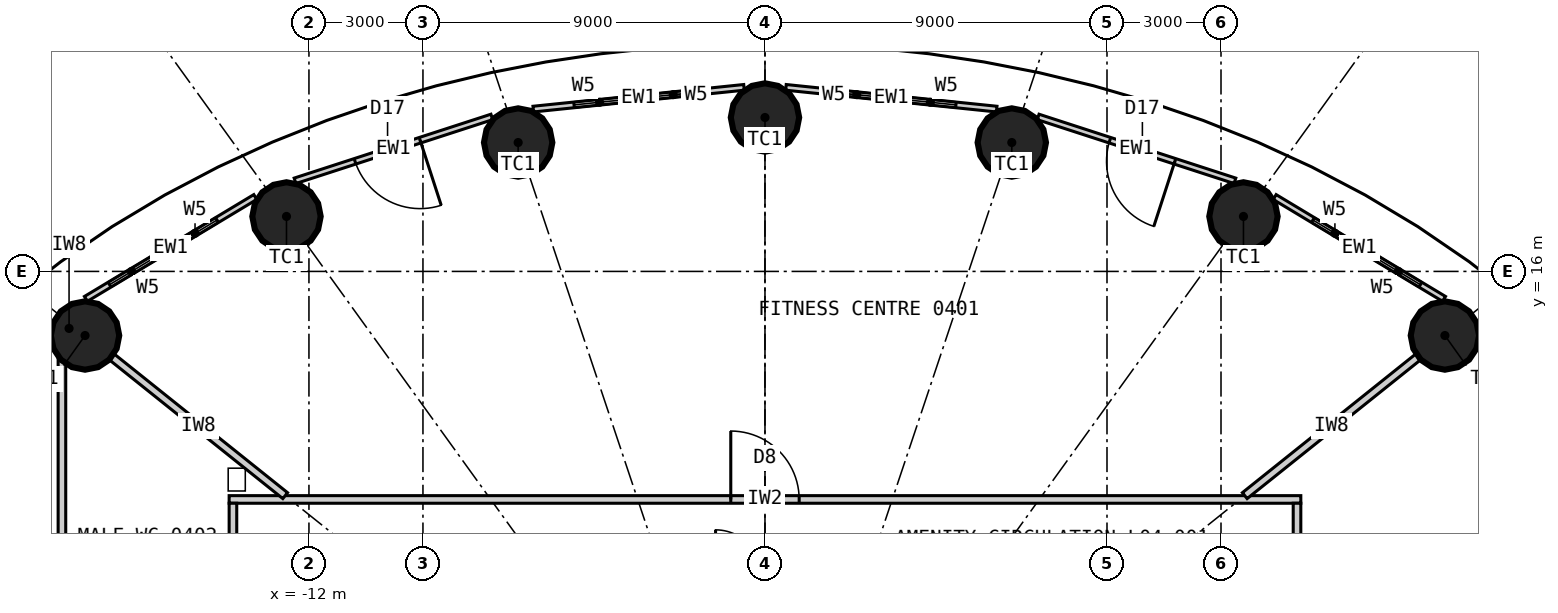
"""IFC4 building model, lengths in metres.
Left out: names, types, materials, properties, quantities, classifications, styles, units other than length and angle.
Written with IfcOpenShell. Run it as: python <this file> out.ifc"""

import sys

from ifc_helpers import new_model, si_unit, direction, frame, frame_2d, origin, origin_2d, place, context, subcontext, project, spatial, rectangle, circle, extrude, element, fill, save


model = new_model("IFC4")
c1 = context("Model", 3, precision=1e-05, world=origin(), true_north=direction((0.0, 1.0)))
c2 = subcontext(c1, "Body", "Model", "MODEL_VIEW")
j1 = project(units=[si_unit("LENGTHUNIT", "METRE"), si_unit("PLANEANGLEUNIT", "RADIAN")], contexts=[c1])
p1 = place(None, origin())
s1 = spatial("IfcSite", under=j1, at=p1, CompositionType="ELEMENT")
p2 = place(p1, origin())
s2 = spatial("IfcBuilding", under=s1, at=p2, CompositionType="ELEMENT")
p3 = place(p2, frame((0.0, 0.0, 24.6)))
s3 = spatial("IfcBuildingStorey", under=s2, at=p3, CompositionType="ELEMENT", Elevation=24.6)
for number, where, z_axis, x_axis in (
    (1, (17.892, 14.313, 0.0), (0.0, 0.0, 1.0), (1.0, 0.0, 0.0)),
    (2, (12.591, 17.447, 0.0), (0.0, 0.0, 1.0), (1.0, 0.0, 0.0)),
    (3, (6.495, 19.391, 0.0), (0.0, 0.0, 1.0), (1.0, 0.0, 0.0)),
    (4, (0.0, 20.05, 0.0), (0.0, 0.0, 1.0), (1.0, 0.0, 0.0)),
    (5, (-6.495, 19.391, 0.0), (0.0, 0.0, 1.0), (1.0, 0.0, 0.0)),
    (6, (-12.591, 17.447, 0.0), (0.0, 0.0, 1.0), (1.0, 0.0, 0.0)),
    (7, (-17.892, 14.313, 0.0), (0.0, 0.0, 1.0), (1.0, 0.0, 0.0)),
):
    element("IfcColumn", number, at=place(p3, frame(where, z_axis=z_axis, x_axis=x_axis)), inside=s3, PredefinedType="COLUMN", context=c2, shape_type="SweptSolid", body=[
        extrude(circle(Radius=0.9, at=origin_2d()), origin(), (0.0, 0.0, 1.0), 4.8),
    ])
p4 = place(p3, frame((22.239, 11.108, 0.0), z_axis=(0.0, 0.0, 1.0), x_axis=(-0.699612594083, 0.714522370679, 0.0)))
e8 = element("IfcWall", 8, at=p4, inside=s3, PredefinedType="ELEMENTEDWALL", context=c2, shape_type="SweptSolid", body=[
    extrude(rectangle(XDim=4.896, YDim=0.15, at=frame_2d((2.448, 0.0))), origin(), (0.0, 0.0, 1.0), 4.62),
])
p5 = place(p4, frame((0.569, 0.0, 0.6)))
e9 = element("IfcOpeningElement", 9, at=p5, cuts=e8, PredefinedType="OPENING", context=c2, shape_type="SweptSolid", body=[
    extrude(rectangle(XDim=1.35, YDim=3.0, at=frame_2d((0.675, 1.5))), frame((0.0, 0.085, 0.0), z_axis=(0.0, -1.0, 0.0), x_axis=(1.0, 0.0, 0.0)), (0.0, 0.0, 1.0), 0.17),
])
p6 = place(p4, frame((2.519, 0.0, 0.6)))
e10 = element("IfcOpeningElement", 10, at=p6, cuts=e8, PredefinedType="OPENING", context=c2, shape_type="SweptSolid", body=[
    extrude(rectangle(XDim=1.35, YDim=3.0, at=frame_2d((0.675, 1.5))), frame((0.0, 0.085, 0.0), z_axis=(0.0, -1.0, 0.0), x_axis=(1.0, 0.0, 0.0)), (0.0, 0.0, 1.0), 0.17),
])
p7 = place(p3, frame((17.869, 15.277, 0.0), z_axis=(0.0, 0.0, 1.0), x_axis=(-0.856958191554, 0.515385931054, 0.0)))
e11 = element("IfcWall", 11, at=p7, inside=s3, PredefinedType="ELEMENTEDWALL", context=c2, shape_type="SweptSolid", body=[
    extrude(rectangle(XDim=5.201, YDim=0.15, at=frame_2d((2.601, 0.0))), origin(), (0.0, 0.0, 1.0), 4.62),
])
p8 = place(p7, frame((0.726, 0.0, 0.6)))
e12 = element("IfcOpeningElement", 12, at=p8, cuts=e11, PredefinedType="OPENING", context=c2, shape_type="SweptSolid", body=[
    extrude(rectangle(XDim=1.35, YDim=3.0, at=frame_2d((0.675, 1.5))), frame((0.0, 0.085, 0.0), z_axis=(0.0, -1.0, 0.0), x_axis=(1.0, 0.0, 0.0)), (0.0, 0.0, 1.0), 0.17),
])
p9 = place(p7, frame((2.676, 0.0, 0.6)))
e13 = element("IfcOpeningElement", 13, at=p9, cuts=e11, PredefinedType="OPENING", context=c2, shape_type="SweptSolid", body=[
    extrude(rectangle(XDim=1.35, YDim=3.0, at=frame_2d((0.675, 1.5))), frame((0.0, 0.085, 0.0), z_axis=(0.0, -1.0, 0.0), x_axis=(1.0, 0.0, 0.0)), (0.0, 0.0, 1.0), 0.17),
])
p10 = place(p3, frame((12.366, 18.384, 0.0), z_axis=(0.0, 0.0, 1.0), x_axis=(-0.951138486029, 0.308764603532, 0.0)))
e14 = element("IfcWall", 14, at=p10, inside=s3, PredefinedType="ELEMENTEDWALL", context=c2, shape_type="SweptSolid", body=[
    extrude(rectangle(XDim=5.444, YDim=0.15, at=frame_2d((2.722, 0.0))), origin(), (0.0, 0.0, 1.0), 4.62),
])
p11 = place(p10, frame((1.66, 0.0, 0.0)))
e15 = element("IfcOpeningElement", 15, at=p11, cuts=e14, PredefinedType="OPENING", context=c2, shape_type="SweptSolid", body=[
    extrude(rectangle(XDim=1.8, YDim=2.7, at=frame_2d((0.9, 1.35))), frame((0.0, 0.085, 0.0), z_axis=(0.0, -1.0, 0.0), x_axis=(1.0, 0.0, 0.0)), (0.0, 0.0, 1.0), 0.17),
])
p12 = place(p3, frame((6.098, 20.271, 0.0), z_axis=(0.0, 0.0, 1.0), x_axis=(-0.994723735084, 0.102589915983, 0.0)))
e16 = element("IfcWall", 16, at=p12, inside=s3, PredefinedType="ELEMENTEDWALL", context=c2, shape_type="SweptSolid", body=[
    extrude(rectangle(XDim=5.576, YDim=0.15, at=frame_2d((2.788, 0.0))), origin(), (0.0, 0.0, 1.0), 4.62),
])
p13 = place(p12, frame((1.079, 0.0, 0.6)))
e17 = element("IfcOpeningElement", 17, at=p13, cuts=e16, PredefinedType="OPENING", context=c2, shape_type="SweptSolid", body=[
    extrude(rectangle(XDim=1.35, YDim=3.0, at=frame_2d((0.675, 1.5))), frame((0.0, 0.085, 0.0), z_axis=(0.0, -1.0, 0.0), x_axis=(1.0, 0.0, 0.0)), (0.0, 0.0, 1.0), 0.17),
])
p14 = place(p12, frame((3.029, 0.0, 0.6)))
e18 = element("IfcOpeningElement", 18, at=p14, cuts=e16, PredefinedType="OPENING", context=c2, shape_type="SweptSolid", body=[
    extrude(rectangle(XDim=1.35, YDim=3.0, at=frame_2d((0.675, 1.5))), frame((0.0, 0.085, 0.0), z_axis=(0.0, -1.0, 0.0), x_axis=(1.0, 0.0, 0.0)), (0.0, 0.0, 1.0), 0.17),
])
p15 = place(p3, frame((-0.551, 20.843, 0.0), z_axis=(0.0, 0.0, 1.0), x_axis=(-0.994723735084, -0.102589915983, 0.0)))
e19 = element("IfcWall", 19, at=p15, inside=s3, PredefinedType="ELEMENTEDWALL", context=c2, shape_type="SweptSolid", body=[
    extrude(rectangle(XDim=5.576, YDim=0.15, at=frame_2d((2.788, 0.0))), origin(), (0.0, 0.0, 1.0), 4.62),
])
p16 = place(p15, frame((1.197, 0.0, 0.6)))
e20 = element("IfcOpeningElement", 20, at=p16, cuts=e19, PredefinedType="OPENING", context=c2, shape_type="SweptSolid", body=[
    extrude(rectangle(XDim=1.35, YDim=3.0, at=frame_2d((0.675, 1.5))), frame((0.0, 0.085, 0.0), z_axis=(0.0, -1.0, 0.0), x_axis=(1.0, 0.0, 0.0)), (0.0, 0.0, 1.0), 0.17),
])
p17 = place(p15, frame((3.147, 0.0, 0.6)))
e21 = element("IfcOpeningElement", 21, at=p17, cuts=e19, PredefinedType="OPENING", context=c2, shape_type="SweptSolid", body=[
    extrude(rectangle(XDim=1.35, YDim=3.0, at=frame_2d((0.675, 1.5))), frame((0.0, 0.085, 0.0), z_axis=(0.0, -1.0, 0.0), x_axis=(1.0, 0.0, 0.0)), (0.0, 0.0, 1.0), 0.17),
])
p18 = place(p3, frame((-7.188, 20.065, 0.0), z_axis=(0.0, 0.0, 1.0), x_axis=(-0.951138486029, -0.308764603532, 0.0)))
e22 = element("IfcWall", 22, at=p18, inside=s3, PredefinedType="ELEMENTEDWALL", context=c2, shape_type="SweptSolid", body=[
    extrude(rectangle(XDim=5.444, YDim=0.15, at=frame_2d((2.722, 0.0))), origin(), (0.0, 0.0, 1.0), 4.62),
])
p19 = place(p18, frame((1.984, 0.0, 0.0)))
e23 = element("IfcOpeningElement", 23, at=p19, cuts=e22, PredefinedType="OPENING", context=c2, shape_type="SweptSolid", body=[
    extrude(rectangle(XDim=1.8, YDim=2.7, at=frame_2d((0.9, 1.35))), frame((0.0, 0.085, 0.0), z_axis=(0.0, -1.0, 0.0), x_axis=(1.0, 0.0, 0.0)), (0.0, 0.0, 1.0), 0.17),
])
p20 = place(p3, frame((-13.412, 17.957, 0.0), z_axis=(0.0, 0.0, 1.0), x_axis=(-0.856958191554, -0.515385931054, 0.0)))
e24 = element("IfcWall", 24, at=p20, inside=s3, PredefinedType="ELEMENTEDWALL", context=c2, shape_type="SweptSolid", body=[
    extrude(rectangle(XDim=5.201, YDim=0.15, at=frame_2d((2.601, 0.0))), origin(), (0.0, 0.0, 1.0), 4.62),
])
p21 = place(p20, frame((1.175, 0.0, 0.6)))
e25 = element("IfcOpeningElement", 25, at=p21, cuts=e24, PredefinedType="OPENING", context=c2, shape_type="SweptSolid", body=[
    extrude(rectangle(XDim=1.35, YDim=3.0, at=frame_2d((0.675, 1.5))), frame((0.0, 0.085, 0.0), z_axis=(0.0, -1.0, 0.0), x_axis=(1.0, 0.0, 0.0)), (0.0, 0.0, 1.0), 0.17),
])
p22 = place(p20, frame((3.125, 0.0, 0.6)))
e26 = element("IfcOpeningElement", 26, at=p22, cuts=e24, PredefinedType="OPENING", context=c2, shape_type="SweptSolid", body=[
    extrude(rectangle(XDim=1.35, YDim=3.0, at=frame_2d((0.675, 1.5))), frame((0.0, 0.085, 0.0), z_axis=(0.0, -1.0, 0.0), x_axis=(1.0, 0.0, 0.0)), (0.0, 0.0, 1.0), 0.17),
])
p23 = place(p3, frame((-18.813, 14.607, 0.0), z_axis=(0.0, 0.0, 1.0), x_axis=(-0.699612594083, -0.714522370679, 0.0)))
e27 = element("IfcWall", 27, at=p23, inside=s3, PredefinedType="ELEMENTEDWALL", context=c2, shape_type="SweptSolid", body=[
    extrude(rectangle(XDim=4.896, YDim=0.15, at=frame_2d((2.448, 0.0))), origin(), (0.0, 0.0, 1.0), 4.62),
])
p24 = place(p23, frame((1.027, 0.0, 0.6)))
e28 = element("IfcOpeningElement", 28, at=p24, cuts=e27, PredefinedType="OPENING", context=c2, shape_type="SweptSolid", body=[
    extrude(rectangle(XDim=1.35, YDim=3.0, at=frame_2d((0.675, 1.5))), frame((0.0, 0.085, 0.0), z_axis=(0.0, -1.0, 0.0), x_axis=(1.0, 0.0, 0.0)), (0.0, 0.0, 1.0), 0.17),
])
p25 = place(p23, frame((2.977, 0.0, 0.6)))
e29 = element("IfcOpeningElement", 29, at=p25, cuts=e27, PredefinedType="OPENING", context=c2, shape_type="SweptSolid", body=[
    extrude(rectangle(XDim=1.35, YDim=3.0, at=frame_2d((0.675, 1.5))), frame((0.0, 0.085, 0.0), z_axis=(0.0, -1.0, 0.0), x_axis=(1.0, 0.0, 0.0)), (0.0, 0.0, 1.0), 0.17),
])
p26 = place(p3, frame((-14.1, 10.0, 0.0), z_axis=(0.0, 0.0, 1.0), x_axis=(1.0, 0.0, 0.0)))
e30 = element("IfcWall", 30, at=p26, inside=s3, PredefinedType="PARTITIONING", context=c2, shape_type="SweptSolid", body=[
    extrude(rectangle(XDim=28.2, YDim=0.2, at=frame_2d((14.1, 0.0))), origin(), (0.0, 0.0, 1.0), 4.62),
])
p27 = place(p26, frame((13.2, 0.0, 0.0)))
e31 = element("IfcOpeningElement", 31, at=p27, cuts=e30, PredefinedType="OPENING", context=c2, shape_type="SweptSolid", body=[
    extrude(rectangle(XDim=1.8, YDim=2.4, at=frame_2d((0.9, 1.2))), frame((0.0, 0.11, 0.0), z_axis=(0.0, -1.0, 0.0), x_axis=(1.0, 0.0, 0.0)), (0.0, 0.0, 1.0), 0.22),
])
p28 = place(p3, frame((14.0, -9.9, 0.0), z_axis=(0.0, 0.0, 1.0), x_axis=(0.0, 1.0, 0.0)))
e32 = element("IfcWall", 32, at=p28, inside=s3, PredefinedType="PARTITIONING", context=c2, shape_type="SweptSolid", body=[
    extrude(rectangle(XDim=19.8, YDim=0.2, at=frame_2d((9.9, 0.0))), origin(), (0.0, 0.0, 1.0), 4.62),
])
p29 = place(p28, frame((9.0, 0.0, 0.0)))
e33 = element("IfcOpeningElement", 33, at=p29, cuts=e32, PredefinedType="OPENING", context=c2, shape_type="SweptSolid", body=[
    extrude(rectangle(XDim=1.8, YDim=2.4, at=frame_2d((0.9, 1.2))), frame((0.0, 0.11, 0.0), z_axis=(0.0, -1.0, 0.0), x_axis=(1.0, 0.0, 0.0)), (0.0, 0.0, 1.0), 0.22),
])
p30 = place(p3, frame((-14.0, 9.9, 0.0), z_axis=(0.0, 0.0, 1.0), x_axis=(0.0, -1.0, 0.0)))
e34 = element("IfcWall", 34, at=p30, inside=s3, PredefinedType="PARTITIONING", context=c2, shape_type="SweptSolid", body=[
    extrude(rectangle(XDim=19.8, YDim=0.2, at=frame_2d((9.9, 0.0))), origin(), (0.0, 0.0, 1.0), 4.62),
])
p31 = place(p30, frame((2.889, 0.0, 0.0)))
e35 = element("IfcOpeningElement", 35, at=p31, cuts=e34, PredefinedType="OPENING", context=c2, shape_type="SweptSolid", body=[
    extrude(rectangle(XDim=0.9, YDim=2.1, at=frame_2d((0.45, 1.05))), frame((0.0, 0.11, 0.0), z_axis=(0.0, -1.0, 0.0), x_axis=(1.0, 0.0, 0.0)), (0.0, 0.0, 1.0), 0.22),
])
p32 = place(p30, frame((9.45, 0.0, 0.0)))
e36 = element("IfcOpeningElement", 36, at=p32, cuts=e34, PredefinedType="OPENING", context=c2, shape_type="SweptSolid", body=[
    extrude(rectangle(XDim=0.9, YDim=2.1, at=frame_2d((0.45, 1.05))), frame((0.0, 0.11, 0.0), z_axis=(0.0, -1.0, 0.0), x_axis=(1.0, 0.0, 0.0)), (0.0, 0.0, 1.0), 0.22),
])
p33 = place(p30, frame((14.167, 0.0, 0.0)))
e37 = element("IfcOpeningElement", 37, at=p33, cuts=e34, PredefinedType="OPENING", context=c2, shape_type="SweptSolid", body=[
    extrude(rectangle(XDim=1.0, YDim=2.2, at=frame_2d((0.5, 1.1))), frame((0.0, 0.11, 0.0), z_axis=(0.0, -1.0, 0.0), x_axis=(1.0, 0.0, 0.0)), (0.0, 0.0, 1.0), 0.22),
])
p34 = place(p30, frame((17.756, 0.0, 0.0)))
e38 = element("IfcOpeningElement", 38, at=p34, cuts=e34, PredefinedType="OPENING", context=c2, shape_type="SweptSolid", body=[
    extrude(rectangle(XDim=0.9, YDim=2.2, at=frame_2d((0.45, 1.1))), frame((0.0, 0.11, 0.0), z_axis=(0.0, -1.0, 0.0), x_axis=(1.0, 0.0, 0.0)), (0.0, 0.0, 1.0), 0.22),
])
for number, where, z_axis, x_axis in (
    (39, (12.625, 10.1, 0.0), (0.0, 0.0, 1.0), (0.781, 0.625, 0.0)),
    (40, (-12.625, 10.1, 0.0), (0.0, 0.0, 1.0), (-0.781, 0.625, 0.0)),
):
    element("IfcWall", number, at=place(p3, frame(where, z_axis=z_axis, x_axis=x_axis)), inside=s3, PredefinedType="PARTITIONING", context=c2, shape_type="SweptSolid", body=[
        extrude(rectangle(XDim=5.845, YDim=0.2, at=frame_2d((2.922, 0.0))), origin(), (0.0, 0.0, 1.0), 3.82),
    ])
p35 = place(p3, frame((-18.125, 14.5, 0.0), z_axis=(0.0, 0.0, 1.0), x_axis=(-1.0, 0.0, 0.0)))
e41 = element("IfcWall", 41, at=p35, inside=s3, PredefinedType="PARTITIONING", context=c2, shape_type="SweptSolid", body=[
    extrude(rectangle(XDim=0.375, YDim=0.2, at=frame_2d((0.188, 0.0))), origin(), (0.0, 0.0, 1.0), 4.62),
])
p36 = place(p3, frame((-18.5, 14.5, 0.0), z_axis=(0.0, 0.0, 1.0), x_axis=(0.0, -1.0, 0.0)))
e42 = element("IfcWall", 42, at=p36, inside=s3, PredefinedType="PARTITIONING", context=c2, shape_type="SweptSolid", body=[
    extrude(rectangle(XDim=23.045, YDim=0.2, at=frame_2d((11.522, 0.0))), origin(), (0.0, 0.0, 1.0), 4.62),
])
p37 = place(p8, origin())
e43 = element("IfcWindow", 43, at=p37, inside=s3, PartitioningType="SINGLE_PANEL", PredefinedType="WINDOW", context=c2, shape_type="SweptSolid", body=[
    extrude(rectangle(XDim=1.35, YDim=3.0, at=frame_2d((0.675, 1.5))), frame((0.0, 0.03, 0.0), z_axis=(0.0, -1.0, 0.0), x_axis=(1.0, 0.0, 0.0)), (0.0, 0.0, 1.0), 0.06),
])
fill(e12, e43)
p38 = place(p9, origin())
e44 = element("IfcWindow", 44, at=p38, inside=s3, PartitioningType="SINGLE_PANEL", PredefinedType="WINDOW", context=c2, shape_type="SweptSolid", body=[
    extrude(rectangle(XDim=1.35, YDim=3.0, at=frame_2d((0.675, 1.5))), frame((0.0, 0.03, 0.0), z_axis=(0.0, -1.0, 0.0), x_axis=(1.0, 0.0, 0.0)), (0.0, 0.0, 1.0), 0.06),
])
fill(e13, e44)
p39 = place(p11, origin())
e45 = element("IfcDoor", 45, at=p39, inside=s3, OperationType="DOUBLE_DOOR_DOUBLE_SWING", PredefinedType="DOOR", context=c2, shape_type="SweptSolid", body=[
    extrude(rectangle(XDim=1.8, YDim=2.7, at=frame_2d((0.9, 1.35))), frame((0.0, 0.025, 0.0), z_axis=(0.0, -1.0, 0.0), x_axis=(1.0, 0.0, 0.0)), (0.0, 0.0, 1.0), 0.05),
])
fill(e15, e45)
p40 = place(p13, origin())
e46 = element("IfcWindow", 46, at=p40, inside=s3, PartitioningType="SINGLE_PANEL", PredefinedType="WINDOW", context=c2, shape_type="SweptSolid", body=[
    extrude(rectangle(XDim=1.35, YDim=3.0, at=frame_2d((0.675, 1.5))), frame((0.0, 0.03, 0.0), z_axis=(0.0, -1.0, 0.0), x_axis=(1.0, 0.0, 0.0)), (0.0, 0.0, 1.0), 0.06),
])
fill(e17, e46)
p41 = place(p14, origin())
e47 = element("IfcWindow", 47, at=p41, inside=s3, PartitioningType="SINGLE_PANEL", PredefinedType="WINDOW", context=c2, shape_type="SweptSolid", body=[
    extrude(rectangle(XDim=1.35, YDim=3.0, at=frame_2d((0.675, 1.5))), frame((0.0, 0.03, 0.0), z_axis=(0.0, -1.0, 0.0), x_axis=(1.0, 0.0, 0.0)), (0.0, 0.0, 1.0), 0.06),
])
fill(e18, e47)
p42 = place(p16, origin())
e48 = element("IfcWindow", 48, at=p42, inside=s3, PartitioningType="SINGLE_PANEL", PredefinedType="WINDOW", context=c2, shape_type="SweptSolid", body=[
    extrude(rectangle(XDim=1.35, YDim=3.0, at=frame_2d((0.675, 1.5))), frame((0.0, 0.03, 0.0), z_axis=(0.0, -1.0, 0.0), x_axis=(1.0, 0.0, 0.0)), (0.0, 0.0, 1.0), 0.06),
])
fill(e20, e48)
p43 = place(p17, origin())
e49 = element("IfcWindow", 49, at=p43, inside=s3, PartitioningType="SINGLE_PANEL", PredefinedType="WINDOW", context=c2, shape_type="SweptSolid", body=[
    extrude(rectangle(XDim=1.35, YDim=3.0, at=frame_2d((0.675, 1.5))), frame((0.0, 0.03, 0.0), z_axis=(0.0, -1.0, 0.0), x_axis=(1.0, 0.0, 0.0)), (0.0, 0.0, 1.0), 0.06),
])
fill(e21, e49)
p44 = place(p19, origin())
e50 = element("IfcDoor", 50, at=p44, inside=s3, OperationType="DOUBLE_DOOR_DOUBLE_SWING", PredefinedType="DOOR", context=c2, shape_type="SweptSolid", body=[
    extrude(rectangle(XDim=1.8, YDim=2.7, at=frame_2d((0.9, 1.35))), frame((0.0, 0.025, 0.0), z_axis=(0.0, -1.0, 0.0), x_axis=(1.0, 0.0, 0.0)), (0.0, 0.0, 1.0), 0.05),
])
fill(e23, e50)
p45 = place(p21, origin())
e51 = element("IfcWindow", 51, at=p45, inside=s3, PartitioningType="SINGLE_PANEL", PredefinedType="WINDOW", context=c2, shape_type="SweptSolid", body=[
    extrude(rectangle(XDim=1.35, YDim=3.0, at=frame_2d((0.675, 1.5))), frame((0.0, 0.03, 0.0), z_axis=(0.0, -1.0, 0.0), x_axis=(1.0, 0.0, 0.0)), (0.0, 0.0, 1.0), 0.06),
])
fill(e25, e51)
p46 = place(p22, origin())
e52 = element("IfcWindow", 52, at=p46, inside=s3, PartitioningType="SINGLE_PANEL", PredefinedType="WINDOW", context=c2, shape_type="SweptSolid", body=[
    extrude(rectangle(XDim=1.35, YDim=3.0, at=frame_2d((0.675, 1.5))), frame((0.0, 0.03, 0.0), z_axis=(0.0, -1.0, 0.0), x_axis=(1.0, 0.0, 0.0)), (0.0, 0.0, 1.0), 0.06),
])
fill(e26, e52)
p47 = place(p27, origin())
e53 = element("IfcDoor", 53, at=p47, inside=s3, OperationType="DOUBLE_DOOR_DOUBLE_SWING", PredefinedType="DOOR", context=c2, shape_type="SweptSolid", body=[
    extrude(rectangle(XDim=1.8, YDim=2.4, at=frame_2d((0.9, 1.2))), frame((0.0, 0.025, 0.0), z_axis=(0.0, -1.0, 0.0), x_axis=(1.0, 0.0, 0.0)), (0.0, 0.0, 1.0), 0.05),
])
fill(e31, e53)
save(model, sys.argv[1])
